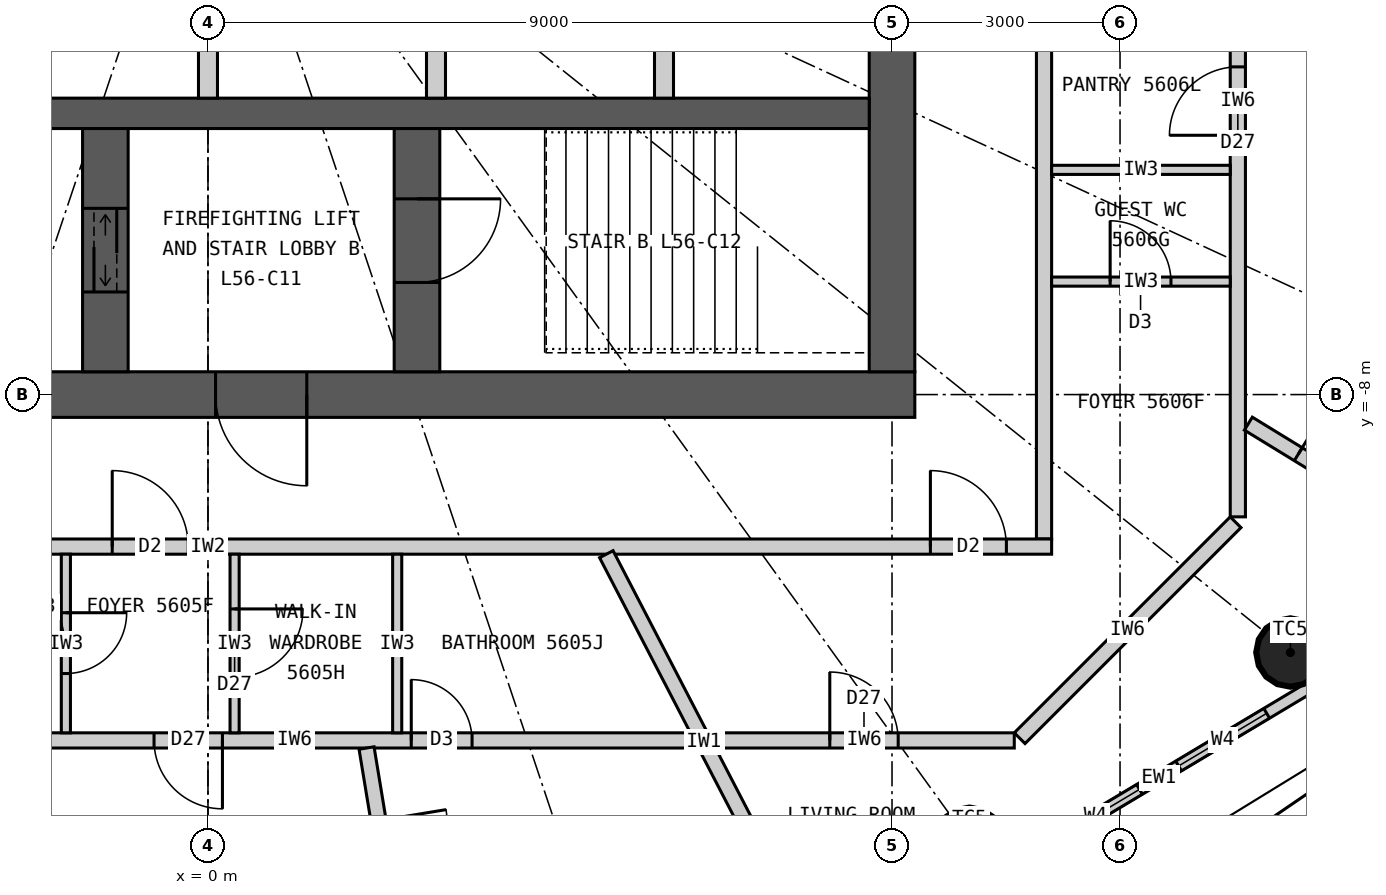
"""IFC4 building model, lengths in metres.
Left out: names, types, materials, properties, quantities, classifications, styles, units other than length and angle.
Written with IfcOpenShell. Run it as: python <this file> out.ifc"""

import sys

from ifc_helpers import new_model, si_unit, direction, frame, frame_2d, origin, origin_2d, place, context, subcontext, project, spatial, rectangle, circle, extrude, element, fill, save


model = new_model("IFC4")
c1 = context("Model", 3, precision=1e-05, world=origin(), true_north=direction((0.0, 1.0)))
c2 = subcontext(c1, "Body", "Model", "MODEL_VIEW")
j1 = project(units=[si_unit("LENGTHUNIT", "METRE"), si_unit("PLANEANGLEUNIT", "RADIAN")], contexts=[c1])
p1 = place(None, origin())
s1 = spatial("IfcSite", under=j1, at=p1, CompositionType="ELEMENT")
p2 = place(p1, origin())
s2 = spatial("IfcBuilding", under=s1, at=p2, CompositionType="ELEMENT")
p3 = place(p2, frame((0.0, 0.0, 209.4)))
s3 = spatial("IfcBuildingStorey", under=s2, at=p3, CompositionType="ELEMENT", Elevation=209.4)
for number, where, z_axis, x_axis in (
    (1, (10.019, -13.883, 0.0), (0.0, 0.0, 1.0), (1.0, 0.0, 0.0)),
    (2, (14.241, -11.393, 0.0), (0.0, 0.0, 1.0), (1.0, 0.0, 0.0)),
):
    element("IfcColumn", number, at=place(p3, frame(where, z_axis=z_axis, x_axis=x_axis)), inside=s3, PredefinedType="COLUMN", context=c2, shape_type="SweptSolid", body=[
        extrude(circle(Radius=0.45, at=origin_2d()), origin(), (0.0, 0.0, 1.0), 3.3),
    ])
p4 = place(p3, frame((9.3, -8.0, 0.0), z_axis=(0.0, 0.0, 1.0), x_axis=(-1.0, 0.0, 0.0)))
e3 = element("IfcWall", 3, at=p4, inside=s3, PredefinedType="SHEAR", context=c2, shape_type="SweptSolid", body=[
    extrude(rectangle(XDim=18.6, YDim=0.6, at=frame_2d((9.3, 0.0))), origin(), (0.0, 0.0, 1.0), 3.3),
])
p5 = place(p4, frame((8.0, 0.0, 0.0)))
e4 = element("IfcOpeningElement", 4, at=p5, cuts=e3, PredefinedType="OPENING", context=c2, shape_type="SweptSolid", body=[
    extrude(rectangle(XDim=1.2, YDim=2.2, at=frame_2d((0.6, 1.1))), frame((0.0, 0.31, 0.0), z_axis=(0.0, -1.0, 0.0), x_axis=(1.0, 0.0, 0.0)), (0.0, 0.0, 1.0), 0.62),
])
p6 = place(p4, frame((15.6, 0.0, 0.0)))
e5 = element("IfcOpeningElement", 5, at=p6, cuts=e3, PredefinedType="OPENING", context=c2, shape_type="SweptSolid", body=[
    extrude(rectangle(XDim=0.9, YDim=2.2, at=frame_2d((0.45, 1.1))), frame((0.0, 0.31, 0.0), z_axis=(0.0, -1.0, 0.0), x_axis=(1.0, 0.0, 0.0)), (0.0, 0.0, 1.0), 0.62),
])
p7 = place(p3, frame((9.0, -7.7, 0.0), z_axis=(0.0, 0.0, 1.0), x_axis=(0.0, 1.0, 0.0)))
e6 = element("IfcWall", 6, at=p7, inside=s3, PredefinedType="SHEAR", context=c2, shape_type="SweptSolid", body=[
    extrude(rectangle(XDim=15.4, YDim=0.6, at=frame_2d((7.7, 0.0))), origin(), (0.0, 0.0, 1.0), 3.3),
])
p8 = place(p7, frame((6.8, 0.0, 0.0)))
e7 = element("IfcOpeningElement", 7, at=p8, cuts=e6, PredefinedType="OPENING", context=c2, shape_type="SweptSolid", body=[
    extrude(rectangle(XDim=1.8, YDim=2.2, at=frame_2d((0.9, 1.1))), frame((0.0, 0.31, 0.0), z_axis=(0.0, -1.0, 0.0), x_axis=(1.0, 0.0, 0.0)), (0.0, 0.0, 1.0), 0.62),
])
p9 = place(p3, frame((-8.7, -4.3, 0.0), z_axis=(0.0, 0.0, 1.0), x_axis=(1.0, 0.0, 0.0)))
e8 = element("IfcWall", 8, at=p9, inside=s3, PredefinedType="SHEAR", context=c2, shape_type="SweptSolid", body=[
    extrude(rectangle(XDim=17.4, YDim=0.4, at=frame_2d((8.7, 0.0))), origin(), (0.0, 0.0, 1.0), 3.3),
])
p10 = place(p3, frame((2.75, -7.7, 0.0), z_axis=(0.0, 0.0, 1.0), x_axis=(0.0, 1.0, 0.0)))
e9 = element("IfcWall", 9, at=p10, inside=s3, PredefinedType="SHEAR", context=c2, shape_type="SweptSolid", body=[
    extrude(rectangle(XDim=3.2, YDim=0.6, at=frame_2d((1.6, 0.0))), origin(), (0.0, 0.0, 1.0), 3.3),
])
p11 = place(p10, frame((1.175, 0.0, 0.0)))
e10 = element("IfcOpeningElement", 10, at=p11, cuts=e9, PredefinedType="OPENING", context=c2, shape_type="SweptSolid", body=[
    extrude(rectangle(XDim=1.1, YDim=2.2, at=frame_2d((0.55, 1.1))), frame((0.0, 0.31, 0.0), z_axis=(0.0, -1.0, 0.0), x_axis=(1.0, 0.0, 0.0)), (0.0, 0.0, 1.0), 0.62),
])
p12 = place(p3, frame((-1.35, -7.7, 0.0), z_axis=(0.0, 0.0, 1.0), x_axis=(0.0, 1.0, 0.0)))
e11 = element("IfcWall", 11, at=p12, inside=s3, PredefinedType="SHEAR", context=c2, shape_type="SweptSolid", body=[
    extrude(rectangle(XDim=3.2, YDim=0.6, at=frame_2d((1.6, 0.0))), origin(), (0.0, 0.0, 1.0), 3.3),
])
p13 = place(p12, frame((1.05, 0.0, 0.0)))
e12 = element("IfcOpeningElement", 12, at=p13, cuts=e11, PredefinedType="OPENING", context=c2, shape_type="SweptSolid", body=[
    extrude(rectangle(XDim=1.1, YDim=2.2, at=frame_2d((0.55, 1.1))), frame((0.0, 0.31, 0.0), z_axis=(0.0, -1.0, 0.0), x_axis=(1.0, 0.0, 0.0)), (0.0, 0.0, 1.0), 0.62),
])
for number, where, z_axis, x_axis in (
    (13, (0.0, -4.1, 0.0), (0.0, 0.0, 1.0), (0.0, 1.0, 0.0)),
    (14, (3.0, -4.1, 0.0), (0.0, 0.0, 1.0), (0.0, 1.0, 0.0)),
    (15, (6.0, -4.1, 0.0), (0.0, 0.0, 1.0), (0.0, 1.0, 0.0)),
):
    element("IfcWall", number, at=place(p3, frame(where, z_axis=z_axis, x_axis=x_axis)), inside=s3, PredefinedType="PARTITIONING", context=c2, shape_type="SweptSolid", body=[
        extrude(rectangle(XDim=2.35, YDim=0.25, at=frame_2d((1.175, 0.0))), origin(), (0.0, 0.0, 1.0), 3.3),
    ])
p14 = place(p3, frame((10.346, -14.336, 0.0), z_axis=(0.0, 0.0, 1.0), x_axis=(0.85822150553, 0.513279502265, 0.0)))
e16 = element("IfcWall", 16, at=p14, inside=s3, PredefinedType="ELEMENTEDWALL", context=c2, shape_type="SweptSolid", body=[
    extrude(rectangle(XDim=5.05, YDim=0.15, at=frame_2d((2.525, 0.0))), origin(), (0.0, 0.0, 1.0), 3.12),
])
p15 = place(p14, frame((0.875, 0.0, 0.9)))
e17 = element("IfcOpeningElement", 17, at=p15, cuts=e16, PredefinedType="OPENING", context=c2, shape_type="SweptSolid", body=[
    extrude(rectangle(XDim=1.35, YDim=1.9, at=frame_2d((0.675, 0.95))), frame((0.0, 0.085, 0.0), z_axis=(0.0, -1.0, 0.0), x_axis=(1.0, 0.0, 0.0)), (0.0, 0.0, 1.0), 0.17),
])
p16 = place(p14, frame((2.825, 0.0, 0.9)))
e18 = element("IfcOpeningElement", 18, at=p16, cuts=e16, PredefinedType="OPENING", context=c2, shape_type="SweptSolid", body=[
    extrude(rectangle(XDim=1.35, YDim=1.9, at=frame_2d((0.675, 0.95))), frame((0.0, 0.085, 0.0), z_axis=(0.0, -1.0, 0.0), x_axis=(1.0, 0.0, 0.0)), (0.0, 0.0, 1.0), 0.17),
])
p17 = place(p3, frame((11.0, -9.9, 0.0), z_axis=(0.0, 0.0, 1.0), x_axis=(0.0, 1.0, 0.0)))
e19 = element("IfcWall", 19, at=p17, inside=s3, PredefinedType="PARTITIONING", context=c2, shape_type="SweptSolid", body=[
    extrude(rectangle(XDim=19.8, YDim=0.2, at=frame_2d((9.9, 0.0))), origin(), (0.0, 0.0, 1.0), 3.12),
])
p18 = place(p3, frame((11.1, -10.0, 0.0), z_axis=(0.0, 0.0, 1.0), x_axis=(-1.0, 0.0, 0.0)))
e20 = element("IfcWall", 20, at=p18, inside=s3, PredefinedType="PARTITIONING", context=c2, shape_type="SweptSolid", body=[
    extrude(rectangle(XDim=22.2, YDim=0.2, at=frame_2d((11.1, 0.0))), origin(), (0.0, 0.0, 1.0), 3.12),
])
p19 = place(p18, frame((11.36, 0.0, 0.0)))
e21 = element("IfcOpeningElement", 21, at=p19, cuts=e20, PredefinedType="OPENING", context=c2, shape_type="SweptSolid", body=[
    extrude(rectangle(XDim=1.0, YDim=2.2, at=frame_2d((0.5, 1.1))), frame((0.0, 0.11, 0.0), z_axis=(0.0, -1.0, 0.0), x_axis=(1.0, 0.0, 0.0)), (0.0, 0.0, 1.0), 0.22),
])
p20 = place(p18, frame((0.595, 0.0, 0.0)))
e22 = element("IfcOpeningElement", 22, at=p20, cuts=e20, PredefinedType="OPENING", context=c2, shape_type="SweptSolid", body=[
    extrude(rectangle(XDim=1.0, YDim=2.2, at=frame_2d((0.5, 1.1))), frame((0.0, 0.11, 0.0), z_axis=(0.0, -1.0, 0.0), x_axis=(1.0, 0.0, 0.0)), (0.0, 0.0, 1.0), 0.22),
])
p21 = place(p3, frame((5.241, -10.1, 0.0), z_axis=(0.0, 0.0, 1.0), x_axis=(0.460603196597, -0.887606160008, 0.0)))
e23 = element("IfcWall", 23, at=p21, inside=s3, PredefinedType="PARTITIONING", context=c2, shape_type="SweptSolid", body=[
    extrude(rectangle(XDim=5.58, YDim=0.2, at=frame_2d((2.79, 0.0))), origin(), (0.0, 0.0, 1.0), 3.12),
])
p22 = place(p3, frame((-4.082, -12.55, 0.0), z_axis=(0.0, 0.0, 1.0), x_axis=(1.0, 0.0, 0.0)))
e24 = element("IfcWall", 24, at=p22, inside=s3, PredefinedType="PARTITIONING", context=c2, shape_type="SweptSolid", body=[
    extrude(rectangle(XDim=10.446, YDim=0.2, at=frame_2d((5.223, 0.0))), origin(), (0.0, 0.0, 1.0), 3.12),
])
p23 = place(p22, frame((6.757, 0.0, 0.0)))
e25 = element("IfcOpeningElement", 25, at=p23, cuts=e24, PredefinedType="OPENING", context=c2, shape_type="SweptSolid", body=[
    extrude(rectangle(XDim=0.8, YDim=2.1, at=frame_2d((0.4, 1.05))), frame((0.0, 0.11, 0.0), z_axis=(0.0, -1.0, 0.0), x_axis=(1.0, 0.0, 0.0)), (0.0, 0.0, 1.0), 0.22),
])
p24 = place(p22, frame((3.372, 0.0, 0.0)))
e26 = element("IfcOpeningElement", 26, at=p24, cuts=e24, PredefinedType="OPENING", context=c2, shape_type="SweptSolid", body=[
    extrude(rectangle(XDim=0.9, YDim=2.1, at=frame_2d((0.45, 1.05))), frame((0.0, 0.11, 0.0), z_axis=(0.0, -1.0, 0.0), x_axis=(1.0, 0.0, 0.0)), (0.0, 0.0, 1.0), 0.22),
])
p25 = place(p3, frame((2.086, -12.65, 0.0), z_axis=(0.0, 0.0, 1.0), x_axis=(0.162664077359, -0.986681507852, 0.0)))
e27 = element("IfcWall", 27, at=p25, inside=s3, PredefinedType="PARTITIONING", context=c2, shape_type="SweptSolid", body=[
    extrude(rectangle(XDim=3.538, YDim=0.2, at=frame_2d((1.769, 0.0))), origin(), (0.0, 0.0, 1.0), 3.12),
])
p26 = place(p25, frame((0.97, 0.0, 0.0)))
e28 = element("IfcOpeningElement", 28, at=p26, cuts=e27, PredefinedType="OPENING", context=c2, shape_type="SweptSolid", body=[
    extrude(rectangle(XDim=0.9, YDim=2.1, at=frame_2d((0.45, 1.05))), frame((0.0, 0.11, 0.0), z_axis=(0.0, -1.0, 0.0), x_axis=(1.0, 0.0, 0.0)), (0.0, 0.0, 1.0), 0.22),
])
p27 = place(p3, frame((-1.87, -10.1, 0.0), z_axis=(0.0, 0.0, 1.0), x_axis=(0.0, -1.0, 0.0)))
e29 = element("IfcWall", 29, at=p27, inside=s3, PredefinedType="PARTITIONING", context=c2, shape_type="SweptSolid", body=[
    extrude(rectangle(XDim=2.35, YDim=0.12, at=frame_2d((1.175, 0.0))), origin(), (0.0, 0.0, 1.0), 3.12),
])
p28 = place(p27, frame((0.77, 0.0, 0.0)))
e30 = element("IfcOpeningElement", 30, at=p28, cuts=e29, PredefinedType="OPENING", context=c2, shape_type="SweptSolid", body=[
    extrude(rectangle(XDim=0.8, YDim=2.1, at=frame_2d((0.4, 1.05))), frame((0.0, 0.07, 0.0), z_axis=(0.0, -1.0, 0.0), x_axis=(1.0, 0.0, 0.0)), (0.0, 0.0, 1.0), 0.14),
])
p29 = place(p3, frame((0.35, -10.1, 0.0), z_axis=(0.0, 0.0, 1.0), x_axis=(0.0, -1.0, 0.0)))
e31 = element("IfcWall", 31, at=p29, inside=s3, PredefinedType="PARTITIONING", context=c2, shape_type="SweptSolid", body=[
    extrude(rectangle(XDim=2.35, YDim=0.12, at=frame_2d((1.175, 0.0))), origin(), (0.0, 0.0, 1.0), 3.12),
])
p30 = place(p29, frame((0.72, 0.0, 0.0)))
e32 = element("IfcOpeningElement", 32, at=p30, cuts=e31, PredefinedType="OPENING", context=c2, shape_type="SweptSolid", body=[
    extrude(rectangle(XDim=0.9, YDim=2.1, at=frame_2d((0.45, 1.05))), frame((0.0, 0.07, 0.0), z_axis=(0.0, -1.0, 0.0), x_axis=(1.0, 0.0, 0.0)), (0.0, 0.0, 1.0), 0.14),
])
p31 = place(p3, frame((2.49, -10.1, 0.0), z_axis=(0.0, 0.0, 1.0), x_axis=(0.0, -1.0, 0.0)))
e33 = element("IfcWall", 33, at=p31, inside=s3, PredefinedType="PARTITIONING", context=c2, shape_type="SweptSolid", body=[
    extrude(rectangle(XDim=2.35, YDim=0.12, at=frame_2d((1.175, 0.0))), origin(), (0.0, 0.0, 1.0), 3.12),
])
p32 = place(p3, frame((6.661, -12.55, 0.0), z_axis=(0.0, 0.0, 1.0), x_axis=(1.0, 0.0, 0.0)))
e34 = element("IfcWall", 34, at=p32, inside=s3, PredefinedType="PARTITIONING", context=c2, shape_type="SweptSolid", body=[
    extrude(rectangle(XDim=3.947, YDim=0.2, at=frame_2d((1.974, 0.0))), origin(), (0.0, 0.0, 1.0), 3.12),
])
p33 = place(p32, frame((1.52, 0.0, 0.0)))
e35 = element("IfcOpeningElement", 35, at=p33, cuts=e34, PredefinedType="OPENING", context=c2, shape_type="SweptSolid", body=[
    extrude(rectangle(XDim=0.9, YDim=2.1, at=frame_2d((0.45, 1.05))), frame((0.0, 0.11, 0.0), z_axis=(0.0, -1.0, 0.0), x_axis=(1.0, 0.0, 0.0)), (0.0, 0.0, 1.0), 0.22),
])
p34 = place(p3, frame((10.679, -12.521, 0.0), z_axis=(0.0, 0.0, 1.0), x_axis=(0.707106781187, 0.707106781187, 0.0)))
e36 = element("IfcWall", 36, at=p34, inside=s3, PredefinedType="PARTITIONING", context=c2, shape_type="SweptSolid", body=[
    extrude(rectangle(XDim=4.019, YDim=0.2, at=frame_2d((2.009, 0.0))), origin(), (0.0, 0.0, 1.0), 3.12),
])
p35 = place(p3, frame((13.55, -9.609, 0.0), z_axis=(0.0, 0.0, 1.0), x_axis=(0.0, 1.0, 0.0)))
e37 = element("IfcWall", 37, at=p35, inside=s3, PredefinedType="PARTITIONING", context=c2, shape_type="SweptSolid", body=[
    extrude(rectangle(XDim=10.93, YDim=0.2, at=frame_2d((5.465, 0.0))), origin(), (0.0, 0.0, 1.0), 3.12),
])
p36 = place(p35, frame((5.02, 0.0, 0.0)))
e38 = element("IfcOpeningElement", 38, at=p36, cuts=e37, PredefinedType="OPENING", context=c2, shape_type="SweptSolid", body=[
    extrude(rectangle(XDim=0.9, YDim=2.1, at=frame_2d((0.45, 1.05))), frame((0.0, 0.11, 0.0), z_axis=(0.0, -1.0, 0.0), x_axis=(1.0, 0.0, 0.0)), (0.0, 0.0, 1.0), 0.22),
])
p37 = place(p35, frame((6.877, 0.0, 0.0)))
e39 = element("IfcOpeningElement", 39, at=p37, cuts=e37, PredefinedType="OPENING", context=c2, shape_type="SweptSolid", body=[
    extrude(rectangle(XDim=0.9, YDim=2.1, at=frame_2d((0.45, 1.05))), frame((0.0, 0.11, 0.0), z_axis=(0.0, -1.0, 0.0), x_axis=(1.0, 0.0, 0.0)), (0.0, 0.0, 1.0), 0.22),
])
p38 = place(p35, frame((8.565, 0.0, 0.0)))
e40 = element("IfcOpeningElement", 40, at=p38, cuts=e37, PredefinedType="OPENING", context=c2, shape_type="SweptSolid", body=[
    extrude(rectangle(XDim=0.8, YDim=2.1, at=frame_2d((0.4, 1.05))), frame((0.0, 0.11, 0.0), z_axis=(0.0, -1.0, 0.0), x_axis=(1.0, 0.0, 0.0)), (0.0, 0.0, 1.0), 0.22),
])
p39 = place(p3, frame((13.688, -8.382, 0.0), z_axis=(0.0, 0.0, 1.0), x_axis=(0.852783459586, -0.522264656144, 0.0)))
e41 = element("IfcWall", 41, at=p39, inside=s3, PredefinedType="PARTITIONING", context=c2, shape_type="SweptSolid", body=[
    extrude(rectangle(XDim=3.042, YDim=0.2, at=frame_2d((1.521, 0.0))), origin(), (0.0, 0.0, 1.0), 3.12),
])
p40 = place(p39, frame((0.77, 0.0, 0.0)))
e42 = element("IfcOpeningElement", 42, at=p40, cuts=e41, PredefinedType="OPENING", context=c2, shape_type="SweptSolid", body=[
    extrude(rectangle(XDim=0.9, YDim=2.1, at=frame_2d((0.45, 1.05))), frame((0.0, 0.11, 0.0), z_axis=(0.0, -1.0, 0.0), x_axis=(1.0, 0.0, 0.0)), (0.0, 0.0, 1.0), 0.22),
])
p41 = place(p3, frame((13.655, -2.927, 0.0), z_axis=(0.0, 0.0, 1.0), x_axis=(0.977790419294, -0.209585056568, 0.0)))
e43 = element("IfcWall", 43, at=p41, inside=s3, PredefinedType="PARTITIONING", context=c2, shape_type="SweptSolid", body=[
    extrude(rectangle(XDim=5.66, YDim=0.2, at=frame_2d((2.83, 0.0))), origin(), (0.0, 0.0, 1.0), 2.42),
])
p42 = place(p41, frame((1.82, 0.0, 0.0)))
e44 = element("IfcOpeningElement", 44, at=p42, cuts=e43, PredefinedType="OPENING", context=c2, shape_type="SweptSolid", body=[
    extrude(rectangle(XDim=0.9, YDim=2.1, at=frame_2d((0.45, 1.05))), frame((0.0, 0.11, 0.0), z_axis=(0.0, -1.0, 0.0), x_axis=(1.0, 0.0, 0.0)), (0.0, 0.0, 1.0), 0.22),
])
p43 = place(p3, frame((11.1, -6.514, 0.0), z_axis=(0.0, 0.0, 1.0), x_axis=(1.0, 0.0, 0.0)))
e45 = element("IfcWall", 45, at=p43, inside=s3, PredefinedType="PARTITIONING", context=c2, shape_type="SweptSolid", body=[
    extrude(rectangle(XDim=2.35, YDim=0.12, at=frame_2d((1.175, 0.0))), origin(), (0.0, 0.0, 1.0), 3.12),
])
p44 = place(p43, frame((0.77, 0.0, 0.0)))
e46 = element("IfcOpeningElement", 46, at=p44, cuts=e45, PredefinedType="OPENING", context=c2, shape_type="SweptSolid", body=[
    extrude(rectangle(XDim=0.8, YDim=2.1, at=frame_2d((0.4, 1.05))), frame((0.0, 0.07, 0.0), z_axis=(0.0, -1.0, 0.0), x_axis=(1.0, 0.0, 0.0)), (0.0, 0.0, 1.0), 0.14),
])
p45 = place(p3, frame((11.1, -5.044, 0.0), z_axis=(0.0, 0.0, 1.0), x_axis=(1.0, 0.0, 0.0)))
e47 = element("IfcWall", 47, at=p45, inside=s3, PredefinedType="PARTITIONING", context=c2, shape_type="SweptSolid", body=[
    extrude(rectangle(XDim=2.35, YDim=0.12, at=frame_2d((1.175, 0.0))), origin(), (0.0, 0.0, 1.0), 3.12),
])
p46 = place(p15, origin())
e48 = element("IfcWindow", 48, at=p46, inside=s3, PartitioningType="SINGLE_PANEL", PredefinedType="WINDOW", context=c2, shape_type="SweptSolid", body=[
    extrude(rectangle(XDim=1.35, YDim=1.9, at=frame_2d((0.675, 0.95))), frame((0.0, 0.03, 0.0), z_axis=(0.0, -1.0, 0.0), x_axis=(1.0, 0.0, 0.0)), (0.0, 0.0, 1.0), 0.06),
])
fill(e17, e48)
p47 = place(p16, origin())
e49 = element("IfcWindow", 49, at=p47, inside=s3, PartitioningType="SINGLE_PANEL", PredefinedType="WINDOW", context=c2, shape_type="SweptSolid", body=[
    extrude(rectangle(XDim=1.35, YDim=1.9, at=frame_2d((0.675, 0.95))), frame((0.0, 0.03, 0.0), z_axis=(0.0, -1.0, 0.0), x_axis=(1.0, 0.0, 0.0)), (0.0, 0.0, 1.0), 0.06),
])
fill(e18, e49)
p48 = place(p19, origin())
e50 = element("IfcDoor", 50, at=p48, inside=s3, OperationType="SINGLE_SWING_RIGHT", PredefinedType="DOOR", context=c2, shape_type="SweptSolid", body=[
    extrude(rectangle(XDim=1.0, YDim=2.2, at=frame_2d((0.5, 1.1))), frame((0.0, 0.025, 0.0), z_axis=(0.0, -1.0, 0.0), x_axis=(1.0, 0.0, 0.0)), (0.0, 0.0, 1.0), 0.05),
])
fill(e21, e50)
p49 = place(p28, origin())
e51 = element("IfcDoor", 51, at=p49, inside=s3, OperationType="SINGLE_SWING_LEFT", PredefinedType="DOOR", context=c2, shape_type="SweptSolid", body=[
    extrude(rectangle(XDim=0.8, YDim=2.1, at=frame_2d((0.4, 1.05))), frame((0.0, 0.025, 0.0), z_axis=(0.0, -1.0, 0.0), x_axis=(1.0, 0.0, 0.0)), (0.0, 0.0, 1.0), 0.05),
])
fill(e30, e51)
p50 = place(p30, origin())
e52 = element("IfcDoor", 52, at=p50, inside=s3, OperationType="SINGLE_SWING_LEFT", PredefinedType="DOOR", context=c2, shape_type="SweptSolid", body=[
    extrude(rectangle(XDim=0.9, YDim=2.1, at=frame_2d((0.45, 1.05))), frame((0.0, 0.025, 0.0), z_axis=(0.0, -1.0, 0.0), x_axis=(1.0, 0.0, 0.0)), (0.0, 0.0, 1.0), 0.05),
])
fill(e32, e52)
p51 = place(p23, origin())
e53 = element("IfcDoor", 53, at=p51, inside=s3, OperationType="SINGLE_SWING_LEFT", PredefinedType="DOOR", context=c2, shape_type="SweptSolid", body=[
    extrude(rectangle(XDim=0.8, YDim=2.1, at=frame_2d((0.4, 1.05))), frame((0.0, 0.025, 0.0), z_axis=(0.0, -1.0, 0.0), x_axis=(1.0, 0.0, 0.0)), (0.0, 0.0, 1.0), 0.05),
])
fill(e25, e53)
p52 = place(p24, origin())
e54 = element("IfcDoor", 54, at=p52, inside=s3, OperationType="SINGLE_SWING_RIGHT", PredefinedType="DOOR", context=c2, shape_type="SweptSolid", body=[
    extrude(rectangle(XDim=0.9, YDim=2.1, at=frame_2d((0.45, 1.05))), frame((0.0, 0.025, 0.0), z_axis=(0.0, -1.0, 0.0), x_axis=(1.0, 0.0, 0.0)), (0.0, 0.0, 1.0), 0.05),
])
fill(e26, e54)
p53 = place(p20, origin())
e55 = element("IfcDoor", 55, at=p53, inside=s3, OperationType="SINGLE_SWING_RIGHT", PredefinedType="DOOR", context=c2, shape_type="SweptSolid", body=[
    extrude(rectangle(XDim=1.0, YDim=2.2, at=frame_2d((0.5, 1.1))), frame((0.0, 0.025, 0.0), z_axis=(0.0, -1.0, 0.0), x_axis=(1.0, 0.0, 0.0)), (0.0, 0.0, 1.0), 0.05),
])
fill(e22, e55)
p54 = place(p44, origin())
e56 = element("IfcDoor", 56, at=p54, inside=s3, OperationType="SINGLE_SWING_LEFT", PredefinedType="DOOR", context=c2, shape_type="SweptSolid", body=[
    extrude(rectangle(XDim=0.8, YDim=2.1, at=frame_2d((0.4, 1.05))), frame((0.0, 0.025, 0.0), z_axis=(0.0, -1.0, 0.0), x_axis=(1.0, 0.0, 0.0)), (0.0, 0.0, 1.0), 0.05),
])
fill(e46, e56)
p55 = place(p36, origin())
e57 = element("IfcDoor", 57, at=p55, inside=s3, OperationType="SINGLE_SWING_LEFT", PredefinedType="DOOR", context=c2, shape_type="SweptSolid", body=[
    extrude(rectangle(XDim=0.9, YDim=2.1, at=frame_2d((0.45, 1.05))), frame((0.0, 0.025, 0.0), z_axis=(0.0, -1.0, 0.0), x_axis=(1.0, 0.0, 0.0)), (0.0, 0.0, 1.0), 0.05),
])
fill(e38, e57)
p56 = place(p33, origin())
e58 = element("IfcDoor", 58, at=p56, inside=s3, OperationType="SINGLE_SWING_LEFT", PredefinedType="DOOR", context=c2, shape_type="SweptSolid", body=[
    extrude(rectangle(XDim=0.9, YDim=2.1, at=frame_2d((0.45, 1.05))), frame((0.0, 0.025, 0.0), z_axis=(0.0, -1.0, 0.0), x_axis=(1.0, 0.0, 0.0)), (0.0, 0.0, 1.0), 0.05),
])
fill(e35, e58)
p57 = place(p40, origin())
e59 = element("IfcDoor", 59, at=p57, inside=s3, OperationType="SINGLE_SWING_LEFT", PredefinedType="DOOR", context=c2, shape_type="SweptSolid", body=[
    extrude(rectangle(XDim=0.9, YDim=2.1, at=frame_2d((0.45, 1.05))), frame((0.0, 0.025, 0.0), z_axis=(0.0, -1.0, 0.0), x_axis=(1.0, 0.0, 0.0)), (0.0, 0.0, 1.0), 0.05),
])
fill(e42, e59)
p58 = place(p5, origin())
e60 = element("IfcDoor", 60, at=p58, inside=s3, OperationType="SINGLE_SWING_LEFT", PredefinedType="DOOR", context=c2, shape_type="SweptSolid", body=[
    extrude(rectangle(XDim=1.2, YDim=2.2, at=frame_2d((0.6, 1.1))), frame((0.0, 0.025, 0.0), z_axis=(0.0, -1.0, 0.0), x_axis=(1.0, 0.0, 0.0)), (0.0, 0.0, 1.0), 0.05),
])
fill(e4, e60)
p59 = place(p11, origin())
e61 = element("IfcDoor", 61, at=p59, inside=s3, OperationType="SINGLE_SWING_RIGHT", PredefinedType="DOOR", context=c2, shape_type="SweptSolid", body=[
    extrude(rectangle(XDim=1.1, YDim=2.2, at=frame_2d((0.55, 1.1))), frame((0.0, 0.025, 0.0), z_axis=(0.0, -1.0, 0.0), x_axis=(1.0, 0.0, 0.0)), (0.0, 0.0, 1.0), 0.05),
])
fill(e10, e61)
p60 = place(p13, origin())
e62 = element("IfcDoor", 62, at=p60, inside=s3, OperationType="DOUBLE_DOOR_SLIDING", PredefinedType="DOOR", context=c2, shape_type="SweptSolid", body=[
    extrude(rectangle(XDim=1.1, YDim=2.2, at=frame_2d((0.55, 1.1))), frame((0.0, 0.025, 0.0), z_axis=(0.0, -1.0, 0.0), x_axis=(1.0, 0.0, 0.0)), (0.0, 0.0, 1.0), 0.05),
])
fill(e12, e62)
save(model, sys.argv[1])
